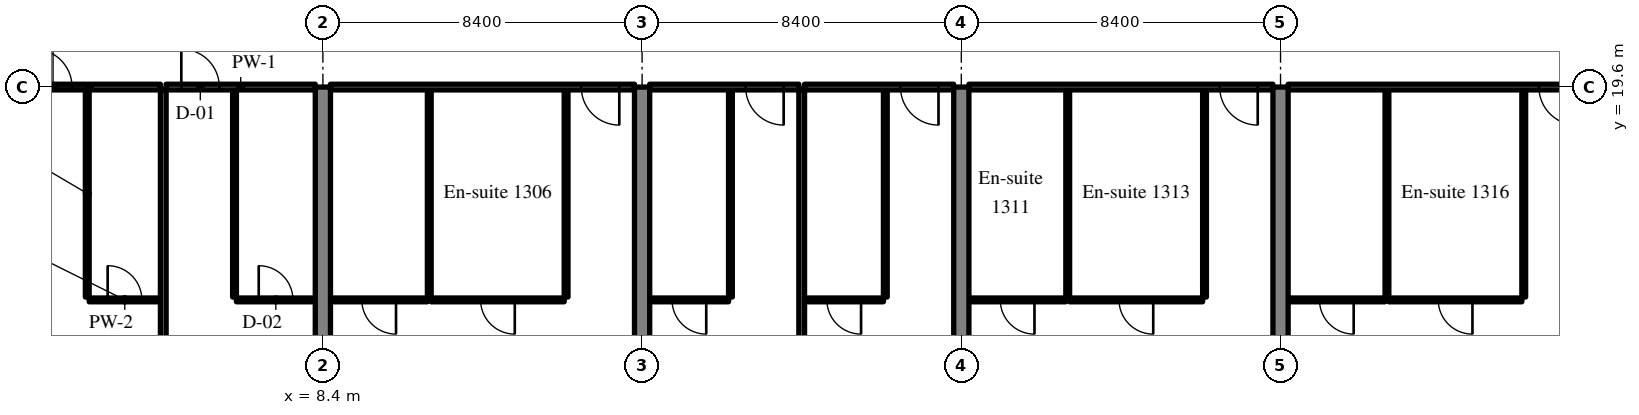
"""IFC4 building model, lengths in metres.
Left out: names, types, materials, properties, quantities, classifications, styles, units other than length and angle.
Written with IfcOpenShell. Run it as: python <this file> out.ifc"""

import sys

from ifc_helpers import new_model, si_unit, direction, frame, frame_2d, origin, place, context, subcontext, project, spatial, rectangle, extrude, source, transform, mapped, element, fill, save


model = new_model("IFC4")
c1 = context("Model", 3, precision=1e-05, world=origin(), true_north=direction((0.0, 1.0)))
c2 = subcontext(c1, "Body", "Model", "MODEL_VIEW")
j1 = project(units=[si_unit("LENGTHUNIT", "METRE"), si_unit("PLANEANGLEUNIT", "RADIAN")], contexts=[c1])
p1 = place(None, origin())
s1 = spatial("IfcSite", under=j1, at=p1, CompositionType="ELEMENT")
p2 = place(p1, origin())
s2 = spatial("IfcBuilding", under=s1, at=p2, CompositionType="ELEMENT")
p3 = place(p2, frame((0.0, 0.0, 58.2)))
s3 = spatial("IfcBuildingStorey", under=s2, at=p3, CompositionType="ELEMENT", Elevation=58.2)
m1 = source(origin(), c2, "Body", "SweptSolid", [
    extrude(rectangle(XDim=19.6, YDim=0.4, at=frame_2d((9.8, 0.0))), origin(), (0.0, 0.0, 1.0), 3.52),
])
for number, where, z_axis, x_axis in (
    (1, (8.4, 0.0, 0.0), (0.0, 0.0, 1.0), (0.0, 1.0, 0.0)),
    (2, (16.8, 0.0, 0.0), (0.0, 0.0, 1.0), (0.0, 1.0, 0.0)),
    (3, (25.2, 0.0, 0.0), (0.0, 0.0, 1.0), (0.0, 1.0, 0.0)),
    (4, (33.6, 0.0, 0.0), (0.0, 0.0, 1.0), (0.0, 1.0, 0.0)),
):
    element("IfcWall", number, at=place(p3, frame(where, z_axis=z_axis, x_axis=x_axis)), inside=s3, PredefinedType="SHEAR", context=c2, shape_type="MappedRepresentation", body=[
        mapped(m1, transform((0.0, 0.0, 0.0), scale=1.0)),
    ])
m2 = source(origin(), c2, "Body", "SweptSolid", [
    extrude(rectangle(XDim=5.45, YDim=0.1, at=frame_2d((2.725, 0.0))), origin(), (0.0, 0.0, 1.0), 3.52),
])
p4 = place(p3, frame((2.2, 14.075, 0.0), z_axis=(0.0, 0.0, 1.0), x_axis=(0.0, 1.0, 0.0)))
e5 = element("IfcWall", 5, at=p4, inside=s3, PredefinedType="PARTITIONING", context=c2, shape_type="MappedRepresentation", body=[
    mapped(m2, transform((0.0, 0.0, 0.0), scale=1.0)),
])
m3 = source(origin(), c2, "Body", "SweptSolid", [
    extrude(rectangle(XDim=1.875, YDim=0.1, at=frame_2d((0.938, 0.0))), origin(), (0.0, 0.0, 1.0), 3.52),
])
p5 = place(p3, frame((2.25, 14.0, 0.0), z_axis=(0.0, 0.0, 1.0), x_axis=(1.0, 0.0, 0.0)))
e6 = element("IfcWall", 6, at=p5, inside=s3, PredefinedType="PARTITIONING", context=c2, shape_type="MappedRepresentation", body=[
    mapped(m3, transform((0.0, 0.0, 0.0), scale=1.0)),
])
m4 = source(origin(), c2, "Body", "SweptSolid", [
    extrude(rectangle(XDim=0.9, YDim=2.1, at=frame_2d((0.45, 1.05))), frame((0.0, 0.06, 0.0), z_axis=(0.0, -1.0, 0.0), x_axis=(1.0, 0.0, 0.0)), (0.0, 0.0, 1.0), 0.12),
])
p6 = place(p5, frame((0.487, 0.0, 0.0)))
e7 = element("IfcOpeningElement", 7, at=p6, cuts=e6, PredefinedType="OPENING", context=c2, shape_type="MappedRepresentation", body=[
    mapped(m4, transform((0.0, 0.0, 0.0), scale=1.0)),
])
m5 = source(origin(), c2, "Body", "SweptSolid", [
    extrude(rectangle(XDim=3.725, YDim=0.15, at=frame_2d((1.863, 0.0))), origin(), (0.0, 0.0, 1.0), 2.82),
])
p7 = place(p3, frame((0.4, 19.6, 0.0), z_axis=(0.0, 0.0, 1.0), x_axis=(1.0, 0.0, 0.0)))
e8 = element("IfcWall", 8, at=p7, inside=s3, PredefinedType="PARTITIONING", context=c2, shape_type="MappedRepresentation", body=[
    mapped(m5, transform((0.0, 0.0, 0.0), scale=1.0)),
])
m6 = source(origin(), c2, "Body", "SweptSolid", [
    extrude(rectangle(XDim=1.0, YDim=2.1, at=frame_2d((0.5, 1.05))), frame((0.0, 0.085, 0.0), z_axis=(0.0, -1.0, 0.0), x_axis=(1.0, 0.0, 0.0)), (0.0, 0.0, 1.0), 0.17),
])
p8 = place(p7, frame((0.4, 0.0, 0.0)))
e9 = element("IfcOpeningElement", 9, at=p8, cuts=e8, PredefinedType="OPENING", context=c2, shape_type="MappedRepresentation", body=[
    mapped(m6, transform((0.0, 0.0, 0.0), scale=1.0)),
])
p9 = place(p3, frame((6.075, 14.075, 0.0), z_axis=(0.0, 0.0, 1.0), x_axis=(0.0, 1.0, 0.0)))
e10 = element("IfcWall", 10, at=p9, inside=s3, PredefinedType="PARTITIONING", context=c2, shape_type="MappedRepresentation", body=[
    mapped(m2, transform((0.0, 0.0, 0.0), scale=1.0)),
])
m7 = source(origin(), c2, "Body", "SweptSolid", [
    extrude(rectangle(XDim=2.075, YDim=0.1, at=frame_2d((1.038, 0.0))), origin(), (0.0, 0.0, 1.0), 3.52),
])
p10 = place(p3, frame((6.125, 14.0, 0.0), z_axis=(0.0, 0.0, 1.0), x_axis=(1.0, 0.0, 0.0)))
e11 = element("IfcWall", 11, at=p10, inside=s3, PredefinedType="PARTITIONING", context=c2, shape_type="MappedRepresentation", body=[
    mapped(m7, transform((0.0, 0.0, 0.0), scale=1.0)),
])
p11 = place(p10, frame((0.587, 0.0, 0.0)))
e12 = element("IfcOpeningElement", 12, at=p11, cuts=e11, PredefinedType="OPENING", context=c2, shape_type="MappedRepresentation", body=[
    mapped(m4, transform((0.0, 0.0, 0.0), scale=1.0)),
])
m8 = source(origin(), c2, "Body", "SweptSolid", [
    extrude(rectangle(XDim=3.925, YDim=0.15, at=frame_2d((1.962, 0.0))), origin(), (0.0, 0.0, 1.0), 2.82),
])
p12 = place(p3, frame((4.275, 19.6, 0.0), z_axis=(0.0, 0.0, 1.0), x_axis=(1.0, 0.0, 0.0)))
e13 = element("IfcWall", 13, at=p12, inside=s3, PredefinedType="PARTITIONING", context=c2, shape_type="MappedRepresentation", body=[
    mapped(m8, transform((0.0, 0.0, 0.0), scale=1.0)),
])
p13 = place(p12, frame((0.4, 0.0, 0.0)))
e14 = element("IfcOpeningElement", 14, at=p13, cuts=e13, PredefinedType="OPENING", context=c2, shape_type="MappedRepresentation", body=[
    mapped(m6, transform((0.0, 0.0, 0.0), scale=1.0)),
])
m9 = source(origin(), c2, "Body", "SweptSolid", [
    extrude(rectangle(XDim=18.947, YDim=0.15, at=frame_2d((9.474, 0.0))), origin(), (0.0, 0.0, 1.0), 3.52),
])
p14 = place(p3, frame((4.2, 0.578, 0.0), z_axis=(0.0, 0.0, 1.0), x_axis=(0.0, 1.0, 0.0)))
e15 = element("IfcWall", 15, at=p14, inside=s3, PredefinedType="PARTITIONING", context=c2, shape_type="MappedRepresentation", body=[
    mapped(m9, transform((0.0, 0.0, 0.0), scale=1.0)),
])
for number, where, z_axis, x_axis in (
    (16, (14.8, 14.075, 0.0), (0.0, 0.0, 1.0), (0.0, 1.0, 0.0)),
    (17, (11.2, 14.075, 0.0), (0.0, 0.0, 1.0), (0.0, 1.0, 0.0)),
):
    element("IfcWall", number, at=place(p3, frame(where, z_axis=z_axis, x_axis=x_axis)), inside=s3, PredefinedType="PARTITIONING", context=c2, shape_type="MappedRepresentation", body=[
        mapped(m2, transform((0.0, 0.0, 0.0), scale=1.0)),
    ])
m10 = source(origin(), c2, "Body", "SweptSolid", [
    extrude(rectangle(XDim=3.5, YDim=0.1, at=frame_2d((1.75, 0.0))), origin(), (0.0, 0.0, 1.0), 3.52),
])
p15 = place(p3, frame((11.25, 14.0, 0.0), z_axis=(0.0, 0.0, 1.0), x_axis=(1.0, 0.0, 0.0)))
e18 = element("IfcWall", 18, at=p15, inside=s3, PredefinedType="PARTITIONING", context=c2, shape_type="MappedRepresentation", body=[
    mapped(m10, transform((0.0, 0.0, 0.0), scale=1.0)),
])
p16 = place(p15, frame((1.3, 0.0, 0.0)))
e19 = element("IfcOpeningElement", 19, at=p16, cuts=e18, PredefinedType="OPENING", context=c2, shape_type="MappedRepresentation", body=[
    mapped(m4, transform((0.0, 0.0, 0.0), scale=1.0)),
])
m11 = source(origin(), c2, "Body", "SweptSolid", [
    extrude(rectangle(XDim=2.55, YDim=0.1, at=frame_2d((1.275, 0.0))), origin(), (0.0, 0.0, 1.0), 3.52),
])
p17 = place(p3, frame((8.6, 14.0, 0.0), z_axis=(0.0, 0.0, 1.0), x_axis=(1.0, 0.0, 0.0)))
e20 = element("IfcWall", 20, at=p17, inside=s3, PredefinedType="PARTITIONING", context=c2, shape_type="MappedRepresentation", body=[
    mapped(m11, transform((0.0, 0.0, 0.0), scale=1.0)),
])
p18 = place(p17, frame((0.825, 0.0, 0.0)))
e21 = element("IfcOpeningElement", 21, at=p18, cuts=e20, PredefinedType="OPENING", context=c2, shape_type="MappedRepresentation", body=[
    mapped(m4, transform((0.0, 0.0, 0.0), scale=1.0)),
])
m12 = source(origin(), c2, "Body", "SweptSolid", [
    extrude(rectangle(XDim=8.0, YDim=0.15, at=frame_2d((4.0, 0.0))), origin(), (0.0, 0.0, 1.0), 2.82),
])
p19 = place(p3, frame((8.6, 19.6, 0.0), z_axis=(0.0, 0.0, 1.0), x_axis=(1.0, 0.0, 0.0)))
e22 = element("IfcWall", 22, at=p19, inside=s3, PredefinedType="PARTITIONING", context=c2, shape_type="MappedRepresentation", body=[
    mapped(m12, transform((0.0, 0.0, 0.0), scale=1.0)),
])
p20 = place(p19, frame((6.6, 0.0, 0.0)))
e23 = element("IfcOpeningElement", 23, at=p20, cuts=e22, PredefinedType="OPENING", context=c2, shape_type="MappedRepresentation", body=[
    mapped(m6, transform((0.0, 0.0, 0.0), scale=1.0)),
])
p21 = place(p3, frame((19.125, 14.075, 0.0), z_axis=(0.0, 0.0, 1.0), x_axis=(0.0, 1.0, 0.0)))
e24 = element("IfcWall", 24, at=p21, inside=s3, PredefinedType="PARTITIONING", context=c2, shape_type="MappedRepresentation", body=[
    mapped(m2, transform((0.0, 0.0, 0.0), scale=1.0)),
])
p22 = place(p3, frame((17.0, 14.0, 0.0), z_axis=(0.0, 0.0, 1.0), x_axis=(1.0, 0.0, 0.0)))
e25 = element("IfcWall", 25, at=p22, inside=s3, PredefinedType="PARTITIONING", context=c2, shape_type="MappedRepresentation", body=[
    mapped(m7, transform((0.0, 0.0, 0.0), scale=1.0)),
])
p23 = place(p22, frame((0.588, 0.0, 0.0)))
e26 = element("IfcOpeningElement", 26, at=p23, cuts=e25, PredefinedType="OPENING", context=c2, shape_type="MappedRepresentation", body=[
    mapped(m4, transform((0.0, 0.0, 0.0), scale=1.0)),
])
p24 = place(p3, frame((17.0, 19.6, 0.0), z_axis=(0.0, 0.0, 1.0), x_axis=(1.0, 0.0, 0.0)))
e27 = element("IfcWall", 27, at=p24, inside=s3, PredefinedType="PARTITIONING", context=c2, shape_type="MappedRepresentation", body=[
    mapped(m8, transform((0.0, 0.0, 0.0), scale=1.0)),
])
p25 = place(p24, frame((2.525, 0.0, 0.0)))
e28 = element("IfcOpeningElement", 28, at=p25, cuts=e27, PredefinedType="OPENING", context=c2, shape_type="MappedRepresentation", body=[
    mapped(m6, transform((0.0, 0.0, 0.0), scale=1.0)),
])
p26 = place(p3, frame((23.2, 14.075, 0.0), z_axis=(0.0, 0.0, 1.0), x_axis=(0.0, 1.0, 0.0)))
e29 = element("IfcWall", 29, at=p26, inside=s3, PredefinedType="PARTITIONING", context=c2, shape_type="MappedRepresentation", body=[
    mapped(m2, transform((0.0, 0.0, 0.0), scale=1.0)),
])
p27 = place(p3, frame((21.075, 14.0, 0.0), z_axis=(0.0, 0.0, 1.0), x_axis=(1.0, 0.0, 0.0)))
e30 = element("IfcWall", 30, at=p27, inside=s3, PredefinedType="PARTITIONING", context=c2, shape_type="MappedRepresentation", body=[
    mapped(m7, transform((0.0, 0.0, 0.0), scale=1.0)),
])
p28 = place(p27, frame((0.587, 0.0, 0.0)))
e31 = element("IfcOpeningElement", 31, at=p28, cuts=e30, PredefinedType="OPENING", context=c2, shape_type="MappedRepresentation", body=[
    mapped(m4, transform((0.0, 0.0, 0.0), scale=1.0)),
])
p29 = place(p3, frame((21.075, 19.6, 0.0), z_axis=(0.0, 0.0, 1.0), x_axis=(1.0, 0.0, 0.0)))
e32 = element("IfcWall", 32, at=p29, inside=s3, PredefinedType="PARTITIONING", context=c2, shape_type="MappedRepresentation", body=[
    mapped(m8, transform((0.0, 0.0, 0.0), scale=1.0)),
])
p30 = place(p29, frame((2.525, 0.0, 0.0)))
e33 = element("IfcOpeningElement", 33, at=p30, cuts=e32, PredefinedType="OPENING", context=c2, shape_type="MappedRepresentation", body=[
    mapped(m6, transform((0.0, 0.0, 0.0), scale=1.0)),
])
m13 = source(origin(), c2, "Body", "SweptSolid", [
    extrude(rectangle(XDim=18.725, YDim=0.15, at=frame_2d((9.362, 0.0))), origin(), (0.0, 0.0, 1.0), 3.52),
])
p31 = place(p3, frame((21.0, 0.8, 0.0), z_axis=(0.0, 0.0, 1.0), x_axis=(0.0, 1.0, 0.0)))
e34 = element("IfcWall", 34, at=p31, inside=s3, PredefinedType="PARTITIONING", context=c2, shape_type="MappedRepresentation", body=[
    mapped(m13, transform((0.0, 0.0, 0.0), scale=1.0)),
])
for number, where, z_axis, x_axis in (
    (35, (31.6, 14.075, 0.0), (0.0, 0.0, 1.0), (0.0, 1.0, 0.0)),
    (36, (28.0, 14.075, 0.0), (0.0, 0.0, 1.0), (0.0, 1.0, 0.0)),
):
    element("IfcWall", number, at=place(p3, frame(where, z_axis=z_axis, x_axis=x_axis)), inside=s3, PredefinedType="PARTITIONING", context=c2, shape_type="MappedRepresentation", body=[
        mapped(m2, transform((0.0, 0.0, 0.0), scale=1.0)),
    ])
p32 = place(p3, frame((28.05, 14.0, 0.0), z_axis=(0.0, 0.0, 1.0), x_axis=(1.0, 0.0, 0.0)))
e37 = element("IfcWall", 37, at=p32, inside=s3, PredefinedType="PARTITIONING", context=c2, shape_type="MappedRepresentation", body=[
    mapped(m10, transform((0.0, 0.0, 0.0), scale=1.0)),
])
p33 = place(p32, frame((1.3, 0.0, 0.0)))
e38 = element("IfcOpeningElement", 38, at=p33, cuts=e37, PredefinedType="OPENING", context=c2, shape_type="MappedRepresentation", body=[
    mapped(m4, transform((0.0, 0.0, 0.0), scale=1.0)),
])
m14 = source(origin(), c2, "Body", "SweptSolid", [
    extrude(rectangle(XDim=2.55, YDim=0.1, at=frame_2d((1.275, 0.0))), origin(), (0.0, 0.0, 1.0), 3.52),
])
p34 = place(p3, frame((25.4, 14.0, 0.0), z_axis=(0.0, 0.0, 1.0), x_axis=(1.0, 0.0, 0.0)))
e39 = element("IfcWall", 39, at=p34, inside=s3, PredefinedType="PARTITIONING", context=c2, shape_type="MappedRepresentation", body=[
    mapped(m14, transform((0.0, 0.0, 0.0), scale=1.0)),
])
p35 = place(p34, frame((0.825, 0.0, 0.0)))
e40 = element("IfcOpeningElement", 40, at=p35, cuts=e39, PredefinedType="OPENING", context=c2, shape_type="MappedRepresentation", body=[
    mapped(m4, transform((0.0, 0.0, 0.0), scale=1.0)),
])
p36 = place(p3, frame((25.4, 19.6, 0.0), z_axis=(0.0, 0.0, 1.0), x_axis=(1.0, 0.0, 0.0)))
e41 = element("IfcWall", 41, at=p36, inside=s3, PredefinedType="PARTITIONING", context=c2, shape_type="MappedRepresentation", body=[
    mapped(m12, transform((0.0, 0.0, 0.0), scale=1.0)),
])
p37 = place(p36, frame((6.6, 0.0, 0.0)))
e42 = element("IfcOpeningElement", 42, at=p37, cuts=e41, PredefinedType="OPENING", context=c2, shape_type="MappedRepresentation", body=[
    mapped(m6, transform((0.0, 0.0, 0.0), scale=1.0)),
])
for number, where, z_axis, x_axis in (
    (43, (40.0, 14.075, 0.0), (0.0, 0.0, 1.0), (0.0, 1.0, 0.0)),
    (44, (36.4, 14.075, 0.0), (0.0, 0.0, 1.0), (0.0, 1.0, 0.0)),
):
    element("IfcWall", number, at=place(p3, frame(where, z_axis=z_axis, x_axis=x_axis)), inside=s3, PredefinedType="PARTITIONING", context=c2, shape_type="MappedRepresentation", body=[
        mapped(m2, transform((0.0, 0.0, 0.0), scale=1.0)),
    ])
p38 = place(p3, frame((36.45, 14.0, 0.0), z_axis=(0.0, 0.0, 1.0), x_axis=(1.0, 0.0, 0.0)))
e45 = element("IfcWall", 45, at=p38, inside=s3, PredefinedType="PARTITIONING", context=c2, shape_type="MappedRepresentation", body=[
    mapped(m10, transform((0.0, 0.0, 0.0), scale=1.0)),
])
p39 = place(p38, frame((1.3, 0.0, 0.0)))
e46 = element("IfcOpeningElement", 46, at=p39, cuts=e45, PredefinedType="OPENING", context=c2, shape_type="MappedRepresentation", body=[
    mapped(m4, transform((0.0, 0.0, 0.0), scale=1.0)),
])
p40 = place(p3, frame((33.8, 14.0, 0.0), z_axis=(0.0, 0.0, 1.0), x_axis=(1.0, 0.0, 0.0)))
e47 = element("IfcWall", 47, at=p40, inside=s3, PredefinedType="PARTITIONING", context=c2, shape_type="MappedRepresentation", body=[
    mapped(m14, transform((0.0, 0.0, 0.0), scale=1.0)),
])
p41 = place(p40, frame((0.825, 0.0, 0.0)))
e48 = element("IfcOpeningElement", 48, at=p41, cuts=e47, PredefinedType="OPENING", context=c2, shape_type="MappedRepresentation", body=[
    mapped(m4, transform((0.0, 0.0, 0.0), scale=1.0)),
])
p42 = place(p3, frame((33.8, 19.6, 0.0), z_axis=(0.0, 0.0, 1.0), x_axis=(1.0, 0.0, 0.0)))
e49 = element("IfcWall", 49, at=p42, inside=s3, PredefinedType="PARTITIONING", context=c2, shape_type="MappedRepresentation", body=[
    mapped(m12, transform((0.0, 0.0, 0.0), scale=1.0)),
])
p43 = place(p42, frame((6.6, 0.0, 0.0)))
e50 = element("IfcOpeningElement", 50, at=p43, cuts=e49, PredefinedType="OPENING", context=c2, shape_type="MappedRepresentation", body=[
    mapped(m6, transform((0.0, 0.0, 0.0), scale=1.0)),
])
m15 = source(origin(), c2, "Body", "SweptSolid", [
    extrude(rectangle(XDim=0.9, YDim=2.1, at=frame_2d((0.45, 1.05))), frame((0.0, 0.025, 0.0), z_axis=(0.0, -1.0, 0.0), x_axis=(1.0, 0.0, 0.0)), (0.0, 0.0, 1.0), 0.05),
])
p44 = place(p6, origin())
e51 = element("IfcDoor", 51, at=p44, inside=s3, OperationType="SINGLE_SWING_LEFT", PredefinedType="DOOR", context=c2, shape_type="MappedRepresentation", body=[
    mapped(m15, transform((0.0, 0.0, 0.0), scale=1.0)),
])
fill(e7, e51)
m16 = source(origin(), c2, "Body", "SweptSolid", [
    extrude(rectangle(XDim=1.0, YDim=2.1, at=frame_2d((0.5, 1.05))), frame((0.0, 0.025, 0.0), z_axis=(0.0, -1.0, 0.0), x_axis=(1.0, 0.0, 0.0)), (0.0, 0.0, 1.0), 0.05),
])
p45 = place(p8, origin())
e52 = element("IfcDoor", 52, at=p45, inside=s3, OperationType="SINGLE_SWING_LEFT", PredefinedType="DOOR", context=c2, shape_type="MappedRepresentation", body=[
    mapped(m16, transform((0.0, 0.0, 0.0), scale=1.0)),
])
fill(e9, e52)
p46 = place(p11, origin())
e53 = element("IfcDoor", 53, at=p46, inside=s3, OperationType="SINGLE_SWING_LEFT", PredefinedType="DOOR", context=c2, shape_type="MappedRepresentation", body=[
    mapped(m15, transform((0.0, 0.0, 0.0), scale=1.0)),
])
fill(e12, e53)
p47 = place(p13, origin())
e54 = element("IfcDoor", 54, at=p47, inside=s3, OperationType="SINGLE_SWING_LEFT", PredefinedType="DOOR", context=c2, shape_type="MappedRepresentation", body=[
    mapped(m16, transform((0.0, 0.0, 0.0), scale=1.0)),
])
fill(e14, e54)
p48 = place(p16, origin())
e55 = element("IfcDoor", 55, at=p48, inside=s3, OperationType="SINGLE_SWING_RIGHT", PredefinedType="DOOR", context=c2, shape_type="MappedRepresentation", body=[
    mapped(m15, transform((0.0, 0.0, 0.0), scale=1.0)),
])
fill(e19, e55)
p49 = place(p18, origin())
e56 = element("IfcDoor", 56, at=p49, inside=s3, OperationType="SINGLE_SWING_RIGHT", PredefinedType="DOOR", context=c2, shape_type="MappedRepresentation", body=[
    mapped(m15, transform((0.0, 0.0, 0.0), scale=1.0)),
])
fill(e21, e56)
p50 = place(p20, origin())
e57 = element("IfcDoor", 57, at=p50, inside=s3, OperationType="SINGLE_SWING_RIGHT", PredefinedType="DOOR", context=c2, shape_type="MappedRepresentation", body=[
    mapped(m16, transform((0.0, 0.0, 0.0), scale=1.0)),
])
fill(e23, e57)
p51 = place(p23, origin())
e58 = element("IfcDoor", 58, at=p51, inside=s3, OperationType="SINGLE_SWING_RIGHT", PredefinedType="DOOR", context=c2, shape_type="MappedRepresentation", body=[
    mapped(m15, transform((0.0, 0.0, 0.0), scale=1.0)),
])
fill(e26, e58)
p52 = place(p25, origin())
e59 = element("IfcDoor", 59, at=p52, inside=s3, OperationType="SINGLE_SWING_RIGHT", PredefinedType="DOOR", context=c2, shape_type="MappedRepresentation", body=[
    mapped(m16, transform((0.0, 0.0, 0.0), scale=1.0)),
])
fill(e28, e59)
p53 = place(p28, origin())
e60 = element("IfcDoor", 60, at=p53, inside=s3, OperationType="SINGLE_SWING_RIGHT", PredefinedType="DOOR", context=c2, shape_type="MappedRepresentation", body=[
    mapped(m15, transform((0.0, 0.0, 0.0), scale=1.0)),
])
fill(e31, e60)
p54 = place(p30, origin())
e61 = element("IfcDoor", 61, at=p54, inside=s3, OperationType="SINGLE_SWING_RIGHT", PredefinedType="DOOR", context=c2, shape_type="MappedRepresentation", body=[
    mapped(m16, transform((0.0, 0.0, 0.0), scale=1.0)),
])
fill(e33, e61)
p55 = place(p33, origin())
e62 = element("IfcDoor", 62, at=p55, inside=s3, OperationType="SINGLE_SWING_RIGHT", PredefinedType="DOOR", context=c2, shape_type="MappedRepresentation", body=[
    mapped(m15, transform((0.0, 0.0, 0.0), scale=1.0)),
])
fill(e38, e62)
p56 = place(p35, origin())
e63 = element("IfcDoor", 63, at=p56, inside=s3, OperationType="SINGLE_SWING_RIGHT", PredefinedType="DOOR", context=c2, shape_type="MappedRepresentation", body=[
    mapped(m15, transform((0.0, 0.0, 0.0), scale=1.0)),
])
fill(e40, e63)
p57 = place(p37, origin())
e64 = element("IfcDoor", 64, at=p57, inside=s3, OperationType="SINGLE_SWING_RIGHT", PredefinedType="DOOR", context=c2, shape_type="MappedRepresentation", body=[
    mapped(m16, transform((0.0, 0.0, 0.0), scale=1.0)),
])
fill(e42, e64)
p58 = place(p39, origin())
e65 = element("IfcDoor", 65, at=p58, inside=s3, OperationType="SINGLE_SWING_RIGHT", PredefinedType="DOOR", context=c2, shape_type="MappedRepresentation", body=[
    mapped(m15, transform((0.0, 0.0, 0.0), scale=1.0)),
])
fill(e46, e65)
p59 = place(p41, origin())
e66 = element("IfcDoor", 66, at=p59, inside=s3, OperationType="SINGLE_SWING_RIGHT", PredefinedType="DOOR", context=c2, shape_type="MappedRepresentation", body=[
    mapped(m15, transform((0.0, 0.0, 0.0), scale=1.0)),
])
fill(e48, e66)
p60 = place(p43, origin())
e67 = element("IfcDoor", 67, at=p60, inside=s3, OperationType="SINGLE_SWING_RIGHT", PredefinedType="DOOR", context=c2, shape_type="MappedRepresentation", body=[
    mapped(m16, transform((0.0, 0.0, 0.0), scale=1.0)),
])
fill(e50, e67)
save(model, sys.argv[1])
